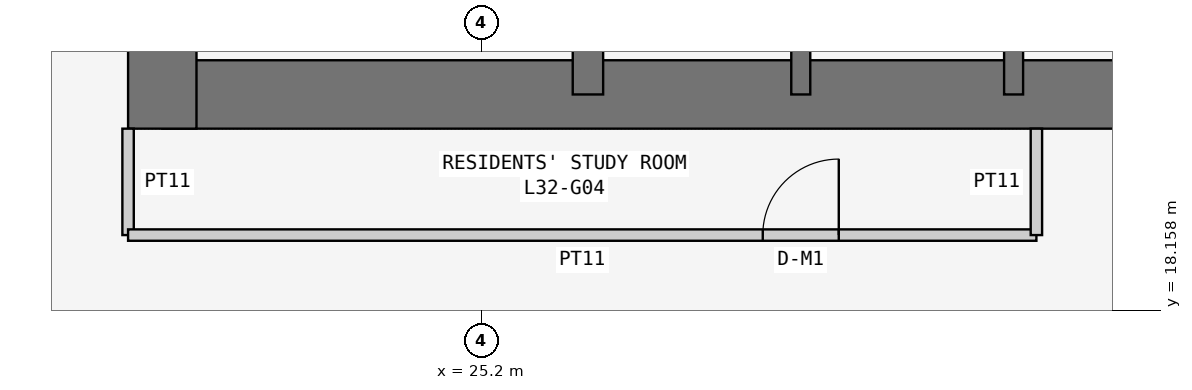
"""IFC4 building model, lengths in metres.
Left out: names, types, materials, properties, quantities, classifications, styles, units other than length and angle.
Written with IfcOpenShell. Run it as: python <this file> out.ifc"""

import sys

from ifc_helpers import new_model, si_unit, direction, frame, frame_2d, origin, place, context, subcontext, project, spatial, rectangle, extrude, element, fill, save


model = new_model("IFC4")
c1 = context("Model", 3, precision=1e-05, world=origin(), true_north=direction((0.0, 1.0)))
c2 = subcontext(c1, "Body", "Model", "MODEL_VIEW")
j1 = project(units=[si_unit("LENGTHUNIT", "METRE"), si_unit("PLANEANGLEUNIT", "RADIAN")], contexts=[c1])
p1 = place(None, origin())
s1 = spatial("IfcSite", under=j1, at=p1, CompositionType="ELEMENT")
p2 = place(p1, origin())
s2 = spatial("IfcBuilding", under=s1, at=p2, CompositionType="ELEMENT")
p3 = place(p2, frame((0.0, 0.0, 126.9)))
s3 = spatial("IfcBuildingStorey", under=s2, at=p3, CompositionType="ELEMENT", Elevation=126.9)
p4 = place(p3, frame((21.0, 21.0, 0.0), z_axis=(0.0, 0.0, 1.0), x_axis=(1.0, 0.0, 0.0)))
e1 = element("IfcWall", 1, at=p4, inside=s3, PredefinedType="SHEAR", context=c2, shape_type="SweptSolid", body=[
    extrude(rectangle(XDim=17.25, YDim=0.9, at=frame_2d((8.625, 0.0))), origin(), (0.0, 0.0, 1.0), 3.6),
])
p5 = place(p3, frame((21.0, 37.8, 0.0), z_axis=(0.0, 0.0, 1.0), x_axis=(0.0, -1.0, 0.0)))
e2 = element("IfcWall", 2, at=p5, inside=s3, PredefinedType="SHEAR", context=c2, shape_type="SweptSolid", body=[
    extrude(rectangle(XDim=17.25, YDim=0.9, at=frame_2d((8.625, 0.0))), origin(), (0.0, 0.0, 1.0), 3.6),
])
p6 = place(p5, frame((5.4, 0.0, 0.0)))
e3 = element("IfcOpeningElement", 3, at=p6, cuts=e2, PredefinedType="OPENING", context=c2, shape_type="SweptSolid", body=[
    extrude(rectangle(XDim=1.2, YDim=2.1, at=frame_2d((0.6, 1.05))), frame((0.0, 0.46, 0.0), z_axis=(0.0, -1.0, 0.0), x_axis=(1.0, 0.0, 0.0)), (0.0, 0.0, 1.0), 0.92),
])
p7 = place(p3, frame((26.6, 21.0, 0.0), z_axis=(0.0, 0.0, 1.0), x_axis=(0.0, 1.0, 0.0)))
e4 = element("IfcWall", 4, at=p7, inside=s3, PredefinedType="SHEAR", context=c2, shape_type="SweptSolid", body=[
    extrude(rectangle(XDim=16.8, YDim=0.4, at=frame_2d((8.4, 0.0))), origin(), (0.0, 0.0, 1.0), 3.6),
])
p8 = place(p7, frame((10.4, 0.0, 0.0)))
e5 = element("IfcOpeningElement", 5, at=p8, cuts=e4, PredefinedType="OPENING", context=c2, shape_type="SweptSolid", body=[
    extrude(rectangle(XDim=1.2, YDim=2.1, at=frame_2d((0.6, 1.05))), frame((0.0, 0.21, 0.0), z_axis=(0.0, -1.0, 0.0), x_axis=(1.0, 0.0, 0.0)), (0.0, 0.0, 1.0), 0.42),
])
for number, where, z_axis, x_axis in (
    (6, (29.4, 21.0, 0.0), (0.0, 0.0, 1.0), (0.0, 1.0, 0.0)),
    (7, (32.2, 21.0, 0.0), (0.0, 0.0, 1.0), (0.0, 1.0, 0.0)),
):
    element("IfcWall", number, at=place(p3, frame(where, z_axis=z_axis, x_axis=x_axis)), inside=s3, PredefinedType="SHEAR", context=c2, shape_type="SweptSolid", body=[
        extrude(rectangle(XDim=3.2, YDim=0.25, at=frame_2d((1.6, 0.0))), origin(), (0.0, 0.0, 1.0), 3.6),
    ])
p9 = place(p3, frame((20.55, 20.55, 0.0), z_axis=(0.0, 0.0, 1.0), x_axis=(0.0, -1.0, 0.0)))
e8 = element("IfcWall", 8, at=p9, inside=s3, PredefinedType="PARTITIONING", context=c2, shape_type="SweptSolid", body=[
    extrude(rectangle(XDim=1.4, YDim=0.15, at=frame_2d((0.7, 0.0))), origin(), (0.0, 0.0, 1.0), 3.45),
])
p10 = place(p3, frame((20.55, 19.15, 0.0), z_axis=(0.0, 0.0, 1.0), x_axis=(1.0, 0.0, 0.0)))
e9 = element("IfcWall", 9, at=p10, inside=s3, PredefinedType="PARTITIONING", context=c2, shape_type="SweptSolid", body=[
    extrude(rectangle(XDim=11.95, YDim=0.15, at=frame_2d((5.975, 0.0))), origin(), (0.0, 0.0, 1.0), 3.45),
])
p11 = place(p10, frame((8.35, 0.0, 0.0)))
e10 = element("IfcOpeningElement", 10, at=p11, cuts=e9, PredefinedType="OPENING", context=c2, shape_type="SweptSolid", body=[
    extrude(rectangle(XDim=1.0, YDim=2.1, at=frame_2d((0.5, 1.05))), frame((0.0, 0.085, 0.0), z_axis=(0.0, -1.0, 0.0), x_axis=(1.0, 0.0, 0.0)), (0.0, 0.0, 1.0), 0.17),
])
p12 = place(p3, frame((32.5, 19.15, 0.0), z_axis=(0.0, 0.0, 1.0), x_axis=(0.0, 1.0, 0.0)))
e11 = element("IfcWall", 11, at=p12, inside=s3, PredefinedType="PARTITIONING", context=c2, shape_type="SweptSolid", body=[
    extrude(rectangle(XDim=1.4, YDim=0.15, at=frame_2d((0.7, 0.0))), origin(), (0.0, 0.0, 1.0), 3.45),
])
p13 = place(p11, origin())
e12 = element("IfcDoor", 12, at=p13, inside=s3, OperationType="SINGLE_SWING_RIGHT", PredefinedType="DOOR", context=c2, shape_type="SweptSolid", body=[
    extrude(rectangle(XDim=1.0, YDim=2.1, at=frame_2d((0.5, 1.05))), frame((0.0, 0.025, 0.0), z_axis=(0.0, -1.0, 0.0), x_axis=(1.0, 0.0, 0.0)), (0.0, 0.0, 1.0), 0.05),
])
fill(e10, e12)
save(model, sys.argv[1])
